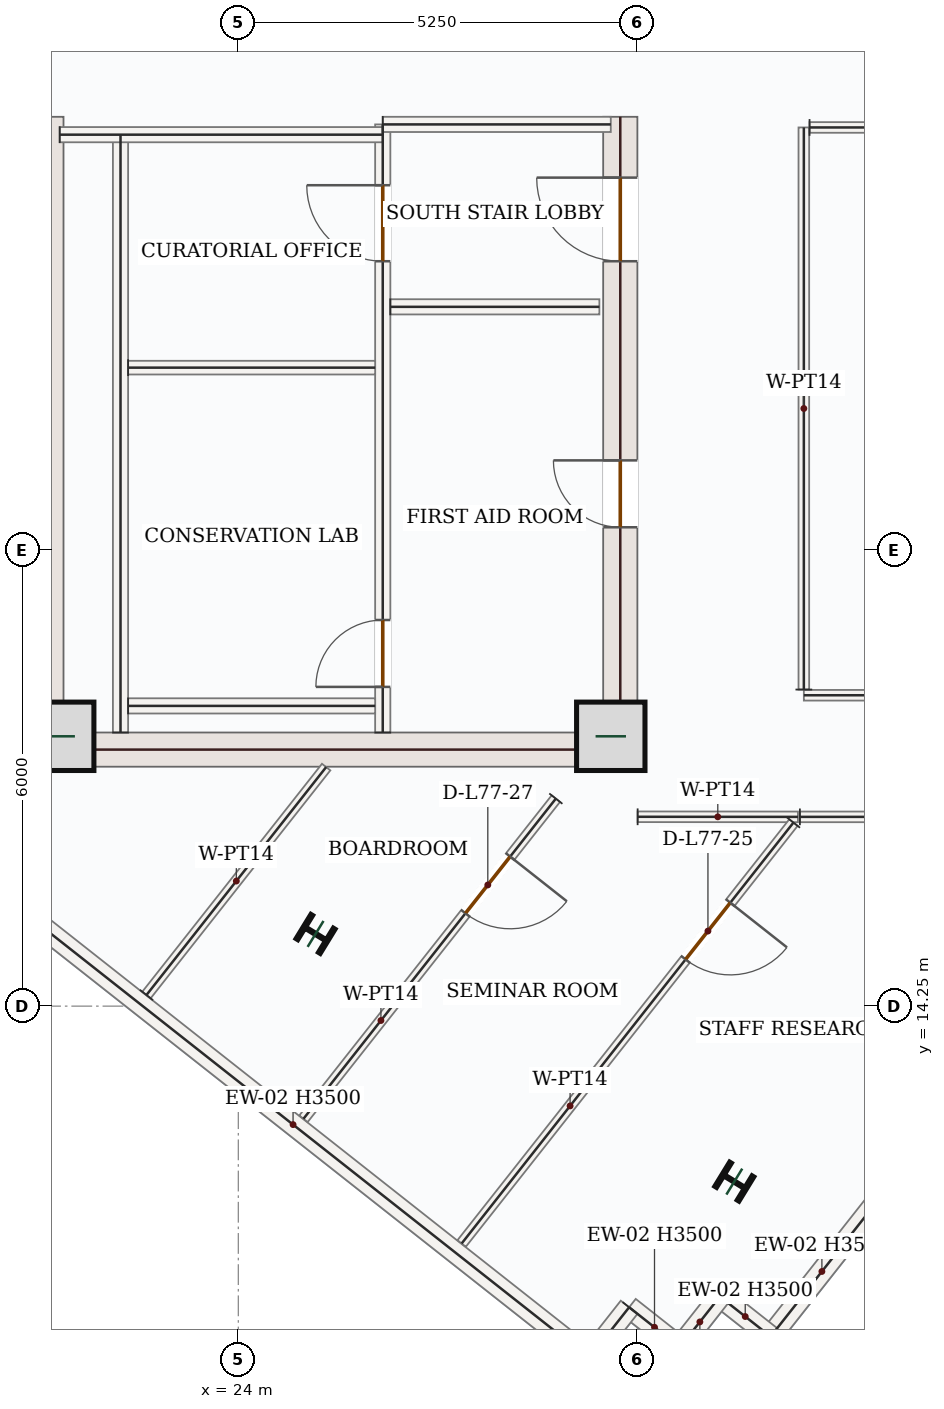
"""IFC4 building model, lengths in metres.
Left out: names, types, materials, properties, quantities, classifications, styles, units other than length and angle.
Written with IfcOpenShell. Run it as: python <this file> out.ifc"""

import sys

from ifc_helpers import new_model, si_unit, direction, frame, frame_2d, origin, origin_2d, place, context, subcontext, project, spatial, rectangle, i_section, extrude, source, transform, mapped, element, fill, save


model = new_model("IFC4")
c1 = context("Model", 3, precision=1e-05, world=origin(), true_north=direction((0.0, 1.0)))
c2 = subcontext(c1, "Body", "Model", "MODEL_VIEW")
j1 = project(units=[si_unit("LENGTHUNIT", "METRE"), si_unit("PLANEANGLEUNIT", "RADIAN")], contexts=[c1])
p1 = place(None, origin())
s1 = spatial("IfcSite", under=j1, at=p1, CompositionType="ELEMENT")
p2 = place(p1, origin())
s2 = spatial("IfcBuilding", under=s1, at=p2, CompositionType="ELEMENT")
p3 = place(p2, frame((0.0, 0.0, 319.8)))
s3 = spatial("IfcBuildingStorey", under=s2, at=p3, CompositionType="ELEMENT", Elevation=319.8)
m1 = source(origin(), c2, "Body", "SweptSolid", [
    extrude(rectangle(XDim=8.55, YDim=0.45, at=frame_2d((4.275, 0.0))), origin(), (0.0, 0.0, 1.0), 3.5),
])
p4 = place(p3, frame((21.475, 17.4, 0.0), z_axis=(0.0, 0.0, 1.0), x_axis=(0.0, 1.0, 0.0)))
e1 = element("IfcWall", 1, at=p4, inside=s3, PredefinedType="SHEAR", context=c2, shape_type="MappedRepresentation", body=[
    mapped(m1, transform((0.0, 0.0, 0.0), x_axis=(1.0, 0.0, 0.0), y_axis=(0.0, 1.0, 0.0), z_axis=(0.0, 0.0, 1.0), scale=1.0)),
])
p5 = place(p3, frame((29.025, 17.4, 0.0), z_axis=(0.0, 0.0, 1.0), x_axis=(0.0, 1.0, 0.0)))
e2 = element("IfcWall", 2, at=p5, inside=s3, PredefinedType="SHEAR", context=c2, shape_type="SweptSolid", body=[
    extrude(rectangle(XDim=8.55, YDim=0.45, at=frame_2d((4.275, 0.0))), origin(), (0.0, 0.0, 1.0), 3.5),
])
p6 = place(p5, frame((6.65, 0.0, 0.0)))
e3 = element("IfcOpeningElement", 3, at=p6, cuts=e2, PredefinedType="OPENING", context=c2, shape_type="SweptSolid", body=[
    extrude(rectangle(XDim=1.1, YDim=2.2, at=frame_2d((0.55, 1.1))), frame((0.0, 0.235, 0.0), z_axis=(0.0, -1.0, 0.0), x_axis=(1.0, 0.0, 0.0)), (0.0, 0.0, 1.0), 0.47),
])
p7 = place(p5, frame((3.15, 0.0, 0.0)))
e4 = element("IfcOpeningElement", 4, at=p7, cuts=e2, PredefinedType="OPENING", context=c2, shape_type="SweptSolid", body=[
    extrude(rectangle(XDim=0.88, YDim=2.1, at=frame_2d((0.44, 1.05))), frame((0.0, 0.235, 0.0), z_axis=(0.0, -1.0, 0.0), x_axis=(1.0, 0.0, 0.0)), (0.0, 0.0, 1.0), 0.47),
])
m2 = source(origin(), c2, "Body", "SweptSolid", [
    extrude(rectangle(XDim=7.1, YDim=0.45, at=frame_2d((3.55, 0.0))), origin(), (0.0, 0.0, 1.0), 3.5),
])
p8 = place(p3, frame((21.7, 17.625, 0.0), z_axis=(0.0, 0.0, 1.0), x_axis=(1.0, 0.0, 0.0)))
e5 = element("IfcWall", 5, at=p8, inside=s3, PredefinedType="SHEAR", context=c2, shape_type="MappedRepresentation", body=[
    mapped(m2, transform((0.0, 0.0, 0.0), x_axis=(1.0, 0.0, 0.0), y_axis=(0.0, 1.0, 0.0), z_axis=(0.0, 0.0, 1.0), scale=1.0)),
])
m3 = source(origin(), c2, "Body", "SweptSolid", [
    extrude(rectangle(XDim=0.9, YDim=0.9, at=origin_2d()), origin(), (0.0, 0.0, 1.0), 3.75),
])
for number, where, z_axis, x_axis in (
    (6, (21.65, 17.8, 0.0), (0.0, 0.0, 1.0), (1.0, 0.0, 0.0)),
    (7, (28.9, 17.8, 0.0), (0.0, 0.0, 1.0), (1.0, 0.0, 0.0)),
):
    element("IfcColumn", number, at=place(p3, frame(where, z_axis=z_axis, x_axis=x_axis)), inside=s3, PredefinedType="COLUMN", context=c2, shape_type="MappedRepresentation", body=[
        mapped(m3, transform((0.0, 0.0, 0.0), x_axis=(1.0, 0.0, 0.0), y_axis=(0.0, 1.0, 0.0), z_axis=(0.0, 0.0, 1.0), scale=1.0)),
    ])
m4 = source(origin(), c2, "Body", "SweptSolid", [
    extrude(i_section(OverallWidth=0.374, OverallDepth=0.372, WebThickness=0.016, FlangeThickness=0.026, FilletRadius=0.018, at=origin_2d()), origin(), (0.0, 0.0, 1.0), 3.75),
])
for number, where, z_axis, x_axis in (
    (8, (25.016, 15.2, 0.0), (0.0, 0.0, 1.0), (0.522, 0.853, 0.0)),
    (9, (30.525, 11.942, 0.0), (0.0, 0.0, 1.0), (0.522, 0.853, 0.0)),
):
    element("IfcColumn", number, at=place(p3, frame(where, z_axis=z_axis, x_axis=x_axis)), inside=s3, PredefinedType="COLUMN", context=c2, shape_type="MappedRepresentation", body=[
        mapped(m4, transform((0.0, 0.0, 0.0), x_axis=(1.0, 0.0, 0.0), y_axis=(0.0, 1.0, 0.0), z_axis=(0.0, 0.0, 1.0), scale=1.0)),
    ])
p9 = place(p3, frame((34.816, 14.74, 0.0), z_axis=(0.0, 0.0, 1.0), x_axis=(-0.619100474058, -0.78531178714, 0.0)))
e10 = element("IfcWall", 10, at=p9, inside=s3, PredefinedType="SOLIDWALL", context=c2, shape_type="SweptSolid", body=[
    extrude(rectangle(XDim=6.159, YDim=0.28, at=frame_2d((3.08, 0.0))), origin(), (0.0, 0.0, 1.0), 3.5),
])
p10 = place(p9, frame((2.329, 0.0, 0.85)))
e11 = element("IfcOpeningElement", 11, at=p10, cuts=e10, PredefinedType="OPENING", context=c2, shape_type="SweptSolid", body=[
    extrude(rectangle(XDim=1.5, YDim=1.5, at=frame_2d((0.75, 0.75))), frame((0.0, 0.15, 0.0), z_axis=(0.0, -1.0, 0.0), x_axis=(1.0, 0.0, 0.0)), (0.0, 0.0, 1.0), 0.3),
])
m5 = source(origin(), c2, "Body", "SweptSolid", [
    extrude(rectangle(XDim=0.85, YDim=0.28, at=frame_2d((0.425, 0.0))), origin(), (0.0, 0.0, 1.0), 3.5),
])
p11 = place(p3, frame((31.003, 9.903, 0.0), z_axis=(0.0, 0.0, 1.0), x_axis=(-0.785220826193, 0.619215838066, 0.0)))
e12 = element("IfcWall", 12, at=p11, inside=s3, PredefinedType="SOLIDWALL", context=c2, shape_type="MappedRepresentation", body=[
    mapped(m5, transform((0.0, 0.0, 0.0), x_axis=(1.0, 0.0, 0.0), y_axis=(0.0, 1.0, 0.0), z_axis=(0.0, 0.0, 1.0), scale=1.0)),
])
m6 = source(origin(), c2, "Body", "SweptSolid", [
    extrude(rectangle(XDim=0.85, YDim=0.28, at=frame_2d((0.425, 0.0))), origin(), (0.0, 0.0, 1.0), 3.5),
])
for number, where, z_axis, x_axis in (
    (13, (30.335, 10.43, 0.0), (0.0, 0.0, 1.0), (-0.619, -0.785, 0.0)),
    (14, (29.809, 9.762, 0.0), (0.0, 0.0, 1.0), (-0.785, 0.619, 0.0)),
):
    element("IfcWall", number, at=place(p3, frame(where, z_axis=z_axis, x_axis=x_axis)), inside=s3, PredefinedType="SOLIDWALL", context=c2, shape_type="MappedRepresentation", body=[
        mapped(m6, transform((0.0, 0.0, 0.0), x_axis=(1.0, 0.0, 0.0), y_axis=(0.0, 1.0, 0.0), z_axis=(0.0, 0.0, 1.0), scale=1.0)),
    ])
p12 = place(p3, frame((29.142, 10.288, 0.0), z_axis=(0.0, 0.0, 1.0), x_axis=(-0.619215838066, -0.785220826193, 0.0)))
e15 = element("IfcWall", 15, at=p12, inside=s3, PredefinedType="SOLIDWALL", context=c2, shape_type="MappedRepresentation", body=[
    mapped(m5, transform((0.0, 0.0, 0.0), x_axis=(1.0, 0.0, 0.0), y_axis=(0.0, 1.0, 0.0), z_axis=(0.0, 0.0, 1.0), scale=1.0)),
])
m7 = source(origin(), c2, "Body", "SweptSolid", [
    extrude(rectangle(XDim=9.92, YDim=0.28, at=frame_2d((4.96, 0.0))), origin(), (0.0, 0.0, 1.0), 3.5),
])
p13 = place(p3, frame((28.615, 9.621, 0.0), z_axis=(0.0, 0.0, 1.0), x_axis=(-0.785317257435, 0.619093535077, 0.0)))
e16 = element("IfcWall", 16, at=p13, inside=s3, PredefinedType="SOLIDWALL", context=c2, shape_type="MappedRepresentation", body=[
    mapped(m7, transform((0.0, 0.0, 0.0), x_axis=(1.0, 0.0, 0.0), y_axis=(0.0, 1.0, 0.0), z_axis=(0.0, 0.0, 1.0), scale=1.0)),
])
m8 = source(origin(), c2, "Body", "SweptSolid", [
    extrude(rectangle(XDim=7.87, YDim=0.2, at=frame_2d((3.935, 0.0))), origin(), (0.0, 0.0, 1.0), 3.5),
])
p14 = place(p3, frame((22.45, 17.85, 0.0), z_axis=(0.0, 0.0, 1.0), x_axis=(0.0, 1.0, 0.0)))
e17 = element("IfcWall", 17, at=p14, inside=s3, PredefinedType="SOLIDWALL", context=c2, shape_type="MappedRepresentation", body=[
    mapped(m8, transform((0.0, 0.0, 0.0), x_axis=(1.0, 0.0, 0.0), y_axis=(0.0, 1.0, 0.0), z_axis=(0.0, 0.0, 1.0), scale=1.0)),
])
p15 = place(p3, frame((25.9, 17.85, 0.0), z_axis=(0.0, 0.0, 1.0), x_axis=(0.0, 1.0, 0.0)))
e18 = element("IfcWall", 18, at=p15, inside=s3, PredefinedType="SOLIDWALL", context=c2, shape_type="SweptSolid", body=[
    extrude(rectangle(XDim=8.0, YDim=0.2, at=frame_2d((4.0, 0.0))), origin(), (0.0, 0.0, 1.0), 3.5),
])
p16 = place(p15, frame((6.2, 0.0, 0.0)))
e19 = element("IfcOpeningElement", 19, at=p16, cuts=e18, PredefinedType="OPENING", context=c2, shape_type="SweptSolid", body=[
    extrude(rectangle(XDim=1.0, YDim=2.15, at=frame_2d((0.5, 1.075))), frame((0.0, 0.11, 0.0), z_axis=(0.0, -1.0, 0.0), x_axis=(1.0, 0.0, 0.0)), (0.0, 0.0, 1.0), 0.22),
])
p17 = place(p15, frame((0.6, 0.0, 0.0)))
e20 = element("IfcOpeningElement", 20, at=p17, cuts=e18, PredefinedType="OPENING", context=c2, shape_type="SweptSolid", body=[
    extrude(rectangle(XDim=0.88, YDim=2.1, at=frame_2d((0.44, 1.05))), frame((0.0, 0.11, 0.0), z_axis=(0.0, -1.0, 0.0), x_axis=(1.0, 0.0, 0.0)), (0.0, 0.0, 1.0), 0.22),
])
m9 = source(origin(), c2, "Body", "SweptSolid", [
    extrude(rectangle(XDim=4.25, YDim=0.2, at=frame_2d((2.125, 0.0))), origin(), (0.0, 0.0, 1.0), 3.5),
])
p18 = place(p3, frame((21.65, 25.715, 0.0), z_axis=(0.0, 0.0, 1.0), x_axis=(1.0, 0.0, 0.0)))
e21 = element("IfcWall", 21, at=p18, inside=s3, PredefinedType="SOLIDWALL", context=c2, shape_type="MappedRepresentation", body=[
    mapped(m9, transform((0.0, 0.0, 0.0), x_axis=(1.0, 0.0, 0.0), y_axis=(0.0, 1.0, 0.0), z_axis=(0.0, 0.0, 1.0), scale=1.0)),
])
m10 = source(origin(), c2, "Body", "SweptSolid", [
    extrude(rectangle(XDim=3.0, YDim=0.2, at=frame_2d((1.5, 0.0))), origin(), (0.0, 0.0, 1.0), 3.5),
])
p19 = place(p3, frame((25.9, 25.85, 0.0), z_axis=(0.0, 0.0, 1.0), x_axis=(1.0, 0.0, 0.0)))
e22 = element("IfcWall", 22, at=p19, inside=s3, PredefinedType="SOLIDWALL", context=c2, shape_type="MappedRepresentation", body=[
    mapped(m10, transform((0.0, 0.0, 0.0), x_axis=(1.0, 0.0, 0.0), y_axis=(0.0, 1.0, 0.0), z_axis=(0.0, 0.0, 1.0), scale=1.0)),
])
m11 = source(origin(), c2, "Body", "SweptSolid", [
    extrude(rectangle(XDim=3.25, YDim=0.2, at=frame_2d((1.625, 0.0))), origin(), (0.0, 0.0, 1.0), 3.5),
])
p20 = place(p3, frame((22.55, 18.2, 0.0), z_axis=(0.0, 0.0, 1.0), x_axis=(1.0, 0.0, 0.0)))
e23 = element("IfcWall", 23, at=p20, inside=s3, PredefinedType="SOLIDWALL", context=c2, shape_type="MappedRepresentation", body=[
    mapped(m11, transform((0.0, 0.0, 0.0), x_axis=(1.0, 0.0, 0.0), y_axis=(0.0, 1.0, 0.0), z_axis=(0.0, 0.0, 1.0), scale=1.0)),
])
m12 = source(origin(), c2, "Body", "SweptSolid", [
    extrude(rectangle(XDim=3.25, YDim=0.18, at=frame_2d((1.625, 0.0))), origin(), (0.0, 0.0, 1.0), 3.5),
])
p21 = place(p3, frame((22.55, 22.65, 0.0), z_axis=(0.0, 0.0, 1.0), x_axis=(1.0, 0.0, 0.0)))
e24 = element("IfcWall", 24, at=p21, inside=s3, PredefinedType="PARTITIONING", context=c2, shape_type="MappedRepresentation", body=[
    mapped(m12, transform((0.0, 0.0, 0.0), x_axis=(1.0, 0.0, 0.0), y_axis=(0.0, 1.0, 0.0), z_axis=(0.0, 0.0, 1.0), scale=1.0)),
])
m13 = source(origin(), c2, "Body", "SweptSolid", [
    extrude(rectangle(XDim=2.75, YDim=0.2, at=frame_2d((1.375, 0.0))), origin(), (0.0, 0.0, 1.0), 3.5),
])
p22 = place(p3, frame((26.0, 23.45, 0.0), z_axis=(0.0, 0.0, 1.0), x_axis=(1.0, 0.0, 0.0)))
e25 = element("IfcWall", 25, at=p22, inside=s3, PredefinedType="SOLIDWALL", context=c2, shape_type="MappedRepresentation", body=[
    mapped(m13, transform((0.0, 0.0, 0.0), x_axis=(1.0, 0.0, 0.0), y_axis=(0.0, 1.0, 0.0), z_axis=(0.0, 0.0, 1.0), scale=1.0)),
])
m14 = source(origin(), c2, "Body", "SweptSolid", [
    extrude(rectangle(XDim=3.818, YDim=0.14, at=frame_2d((1.909, 0.0))), origin(), (0.0, 0.0, 1.0), 3.5),
])
p23 = place(p3, frame((22.792, 14.396, 0.0), z_axis=(0.0, 0.0, 1.0), x_axis=(0.619119655452, 0.78529666511, 0.0)))
e26 = element("IfcWall", 26, at=p23, inside=s3, PredefinedType="PARTITIONING", context=c2, shape_type="MappedRepresentation", body=[
    mapped(m14, transform((0.0, 0.0, 0.0), x_axis=(1.0, 0.0, 0.0), y_axis=(0.0, 1.0, 0.0), z_axis=(0.0, 0.0, 1.0), scale=1.0)),
])
p24 = place(p3, frame((28.177, 16.98, 0.0), z_axis=(0.0, 0.0, 1.0), x_axis=(-0.619105408422, -0.785307897109, 0.0)))
e27 = element("IfcWall", 27, at=p24, inside=s3, PredefinedType="PARTITIONING", context=c2, shape_type="SweptSolid", body=[
    extrude(rectangle(XDim=5.363, YDim=0.14, at=frame_2d((2.682, 0.0))), origin(), (0.0, 0.0, 1.0), 3.5),
])
p25 = place(p24, frame((0.971, 0.0, 0.0)))
e28 = element("IfcOpeningElement", 28, at=p25, cuts=e27, PredefinedType="OPENING", context=c2, shape_type="SweptSolid", body=[
    extrude(rectangle(XDim=0.95, YDim=2.15, at=frame_2d((0.475, 1.075))), frame((0.0, 0.08, 0.0), z_axis=(0.0, -1.0, 0.0), x_axis=(1.0, 0.0, 0.0)), (0.0, 0.0, 1.0), 0.16),
])
m15 = source(origin(), c2, "Body", "SweptSolid", [
    extrude(rectangle(XDim=2.109, YDim=0.14, at=frame_2d((1.054, 0.0))), origin(), (0.0, 0.0, 1.0), 3.5),
])
p26 = place(p3, frame((29.253, 16.741, 0.0), z_axis=(0.0, 0.0, 1.0), x_axis=(0.999999832474, -0.000578837597, 0.0)))
e29 = element("IfcWall", 29, at=p26, inside=s3, PredefinedType="PARTITIONING", context=c2, shape_type="MappedRepresentation", body=[
    mapped(m15, transform((0.0, 0.0, 0.0), x_axis=(1.0, 0.0, 0.0), y_axis=(0.0, 1.0, 0.0), z_axis=(0.0, 0.0, 1.0), scale=1.0)),
])
p27 = place(p3, frame((31.303, 16.665, 0.0), z_axis=(0.0, 0.0, 1.0), x_axis=(-0.619105259882, -0.785308014213, 0.0)))
e30 = element("IfcWall", 30, at=p27, inside=s3, PredefinedType="PARTITIONING", context=c2, shape_type="SweptSolid", body=[
    extrude(rectangle(XDim=7.051, YDim=0.14, at=frame_2d((3.525, 0.0))), origin(), (0.0, 0.0, 1.0), 3.5),
])
p28 = place(p27, frame((1.342, 0.0, 0.0)))
e31 = element("IfcOpeningElement", 31, at=p28, cuts=e30, PredefinedType="OPENING", context=c2, shape_type="SweptSolid", body=[
    extrude(rectangle(XDim=0.95, YDim=2.15, at=frame_2d((0.475, 1.075))), frame((0.0, 0.08, 0.0), z_axis=(0.0, -1.0, 0.0), x_axis=(1.0, 0.0, 0.0)), (0.0, 0.0, 1.0), 0.16),
])
p29 = place(p3, frame((31.388, 16.74, 0.0), z_axis=(0.0, 0.0, 1.0), x_axis=(1.0, 0.0, 0.0)))
e32 = element("IfcWall", 32, at=p29, inside=s3, PredefinedType="PARTITIONING", context=c2, shape_type="SweptSolid", body=[
    extrude(rectangle(XDim=5.837, YDim=0.14, at=frame_2d((2.918, 0.0))), origin(), (0.0, 0.0, 1.0), 3.5),
])
p30 = place(p29, frame((3.812, 0.0, 0.0)))
e33 = element("IfcOpeningElement", 33, at=p30, cuts=e32, PredefinedType="OPENING", context=c2, shape_type="SweptSolid", body=[
    extrude(rectangle(XDim=0.95, YDim=2.15, at=frame_2d((0.475, 1.075))), frame((0.0, 0.08, 0.0), z_axis=(0.0, -1.0, 0.0), x_axis=(1.0, 0.0, 0.0)), (0.0, 0.0, 1.0), 0.16),
])
m16 = source(origin(), c2, "Body", "SweptSolid", [
    extrude(rectangle(XDim=9.12, YDim=0.14, at=frame_2d((4.56, 0.0))), origin(), (0.0, 0.0, 1.0), 3.5),
])
p31 = place(p3, frame((40.56, 18.34, 0.0), z_axis=(0.0, 0.0, 1.0), x_axis=(-1.0, 0.0, 0.0)))
e34 = element("IfcWall", 34, at=p31, inside=s3, PredefinedType="PARTITIONING", context=c2, shape_type="MappedRepresentation", body=[
    mapped(m16, transform((0.0, 0.0, 0.0), x_axis=(1.0, 0.0, 0.0), y_axis=(0.0, 1.0, 0.0), z_axis=(0.0, 0.0, 1.0), scale=1.0)),
])
m17 = source(origin(), c2, "Body", "SweptSolid", [
    extrude(rectangle(XDim=7.395, YDim=0.14, at=frame_2d((3.698, 0.0))), origin(), (0.0, 0.0, 1.0), 3.5),
])
p32 = place(p3, frame((31.44, 18.415, 0.0), z_axis=(0.0, 0.0, 1.0), x_axis=(0.0, 1.0, 0.0)))
e35 = element("IfcWall", 35, at=p32, inside=s3, PredefinedType="PARTITIONING", context=c2, shape_type="MappedRepresentation", body=[
    mapped(m17, transform((0.0, 0.0, 0.0), x_axis=(1.0, 0.0, 0.0), y_axis=(0.0, 1.0, 0.0), z_axis=(0.0, 0.0, 1.0), scale=1.0)),
])
p33 = place(p3, frame((31.515, 25.81, 0.0), z_axis=(0.0, 0.0, 1.0), x_axis=(1.0, 0.0, 0.0)))
e36 = element("IfcWall", 36, at=p33, inside=s3, PredefinedType="PARTITIONING", context=c2, shape_type="SweptSolid", body=[
    extrude(rectangle(XDim=9.045, YDim=0.14, at=frame_2d((4.522, 0.0))), origin(), (0.0, 0.0, 1.0), 3.5),
])
p34 = place(p33, frame((4.048, 0.0, 0.0)))
e37 = element("IfcOpeningElement", 37, at=p34, cuts=e36, PredefinedType="OPENING", context=c2, shape_type="SweptSolid", body=[
    extrude(rectangle(XDim=0.95, YDim=2.15, at=frame_2d((0.475, 1.075))), frame((0.0, 0.08, 0.0), z_axis=(0.0, -1.0, 0.0), x_axis=(1.0, 0.0, 0.0)), (0.0, 0.0, 1.0), 0.16),
])
m18 = source(origin(), c2, "Body", "SweptSolid", [
    extrude(rectangle(XDim=1.0, YDim=2.15, at=frame_2d((0.5, 1.075))), frame((0.0, 0.025, 0.0), z_axis=(0.0, -1.0, 0.0), x_axis=(1.0, 0.0, 0.0)), (0.0, 0.0, 1.0), 0.05),
])
p35 = place(p16, origin())
e38 = element("IfcDoor", 38, at=p35, inside=s3, OperationType="SINGLE_SWING_RIGHT", PredefinedType="DOOR", context=c2, shape_type="MappedRepresentation", body=[
    mapped(m18, transform((0.0, 0.0, 0.0), x_axis=(1.0, 0.0, 0.0), y_axis=(0.0, 1.0, 0.0), z_axis=(0.0, 0.0, 1.0), scale=1.0)),
])
fill(e19, e38)
m19 = source(origin(), c2, "Body", "SweptSolid", [
    extrude(rectangle(XDim=0.88, YDim=2.1, at=frame_2d((0.44, 1.05))), frame((0.0, 0.025, 0.0), z_axis=(0.0, -1.0, 0.0), x_axis=(1.0, 0.0, 0.0)), (0.0, 0.0, 1.0), 0.05),
])
p36 = place(p17, origin())
e39 = element("IfcDoor", 39, at=p36, inside=s3, OperationType="SINGLE_SWING_LEFT", PredefinedType="DOOR", context=c2, shape_type="MappedRepresentation", body=[
    mapped(m19, transform((0.0, 0.0, 0.0), x_axis=(1.0, 0.0, 0.0), y_axis=(0.0, 1.0, 0.0), z_axis=(0.0, 0.0, 1.0), scale=1.0)),
])
fill(e20, e39)
m20 = source(origin(), c2, "Body", "SweptSolid", [
    extrude(rectangle(XDim=1.1, YDim=2.2, at=frame_2d((0.55, 1.1))), frame((0.0, 0.025, 0.0), z_axis=(0.0, -1.0, 0.0), x_axis=(1.0, 0.0, 0.0)), (0.0, 0.0, 1.0), 0.05),
])
p37 = place(p6, origin())
e40 = element("IfcDoor", 40, at=p37, inside=s3, OperationType="SINGLE_SWING_RIGHT", PredefinedType="DOOR", context=c2, shape_type="MappedRepresentation", body=[
    mapped(m20, transform((0.0, 0.0, 0.0), x_axis=(1.0, 0.0, 0.0), y_axis=(0.0, 1.0, 0.0), z_axis=(0.0, 0.0, 1.0), scale=1.0)),
])
fill(e3, e40)
p38 = place(p7, origin())
e41 = element("IfcDoor", 41, at=p38, inside=s3, OperationType="SINGLE_SWING_RIGHT", PredefinedType="DOOR", context=c2, shape_type="MappedRepresentation", body=[
    mapped(m19, transform((0.0, 0.0, 0.0), x_axis=(1.0, 0.0, 0.0), y_axis=(0.0, 1.0, 0.0), z_axis=(0.0, 0.0, 1.0), scale=1.0)),
])
fill(e4, e41)
m21 = source(origin(), c2, "Body", "SweptSolid", [
    extrude(rectangle(XDim=0.95, YDim=2.15, at=frame_2d((0.475, 1.075))), frame((0.0, 0.025, 0.0), z_axis=(0.0, -1.0, 0.0), x_axis=(1.0, 0.0, 0.0)), (0.0, 0.0, 1.0), 0.05),
])
p39 = place(p28, origin())
e42 = element("IfcDoor", 42, at=p39, inside=s3, OperationType="SINGLE_SWING_LEFT", PredefinedType="DOOR", context=c2, shape_type="MappedRepresentation", body=[
    mapped(m21, transform((0.0, 0.0, 0.0), x_axis=(1.0, 0.0, 0.0), y_axis=(0.0, 1.0, 0.0), z_axis=(0.0, 0.0, 1.0), scale=1.0)),
])
fill(e31, e42)
p40 = place(p25, origin())
e43 = element("IfcDoor", 43, at=p40, inside=s3, OperationType="SINGLE_SWING_LEFT", PredefinedType="DOOR", context=c2, shape_type="MappedRepresentation", body=[
    mapped(m21, transform((0.0, 0.0, 0.0), x_axis=(1.0, 0.0, 0.0), y_axis=(0.0, 1.0, 0.0), z_axis=(0.0, 0.0, 1.0), scale=1.0)),
])
fill(e28, e43)
save(model, sys.argv[1])
